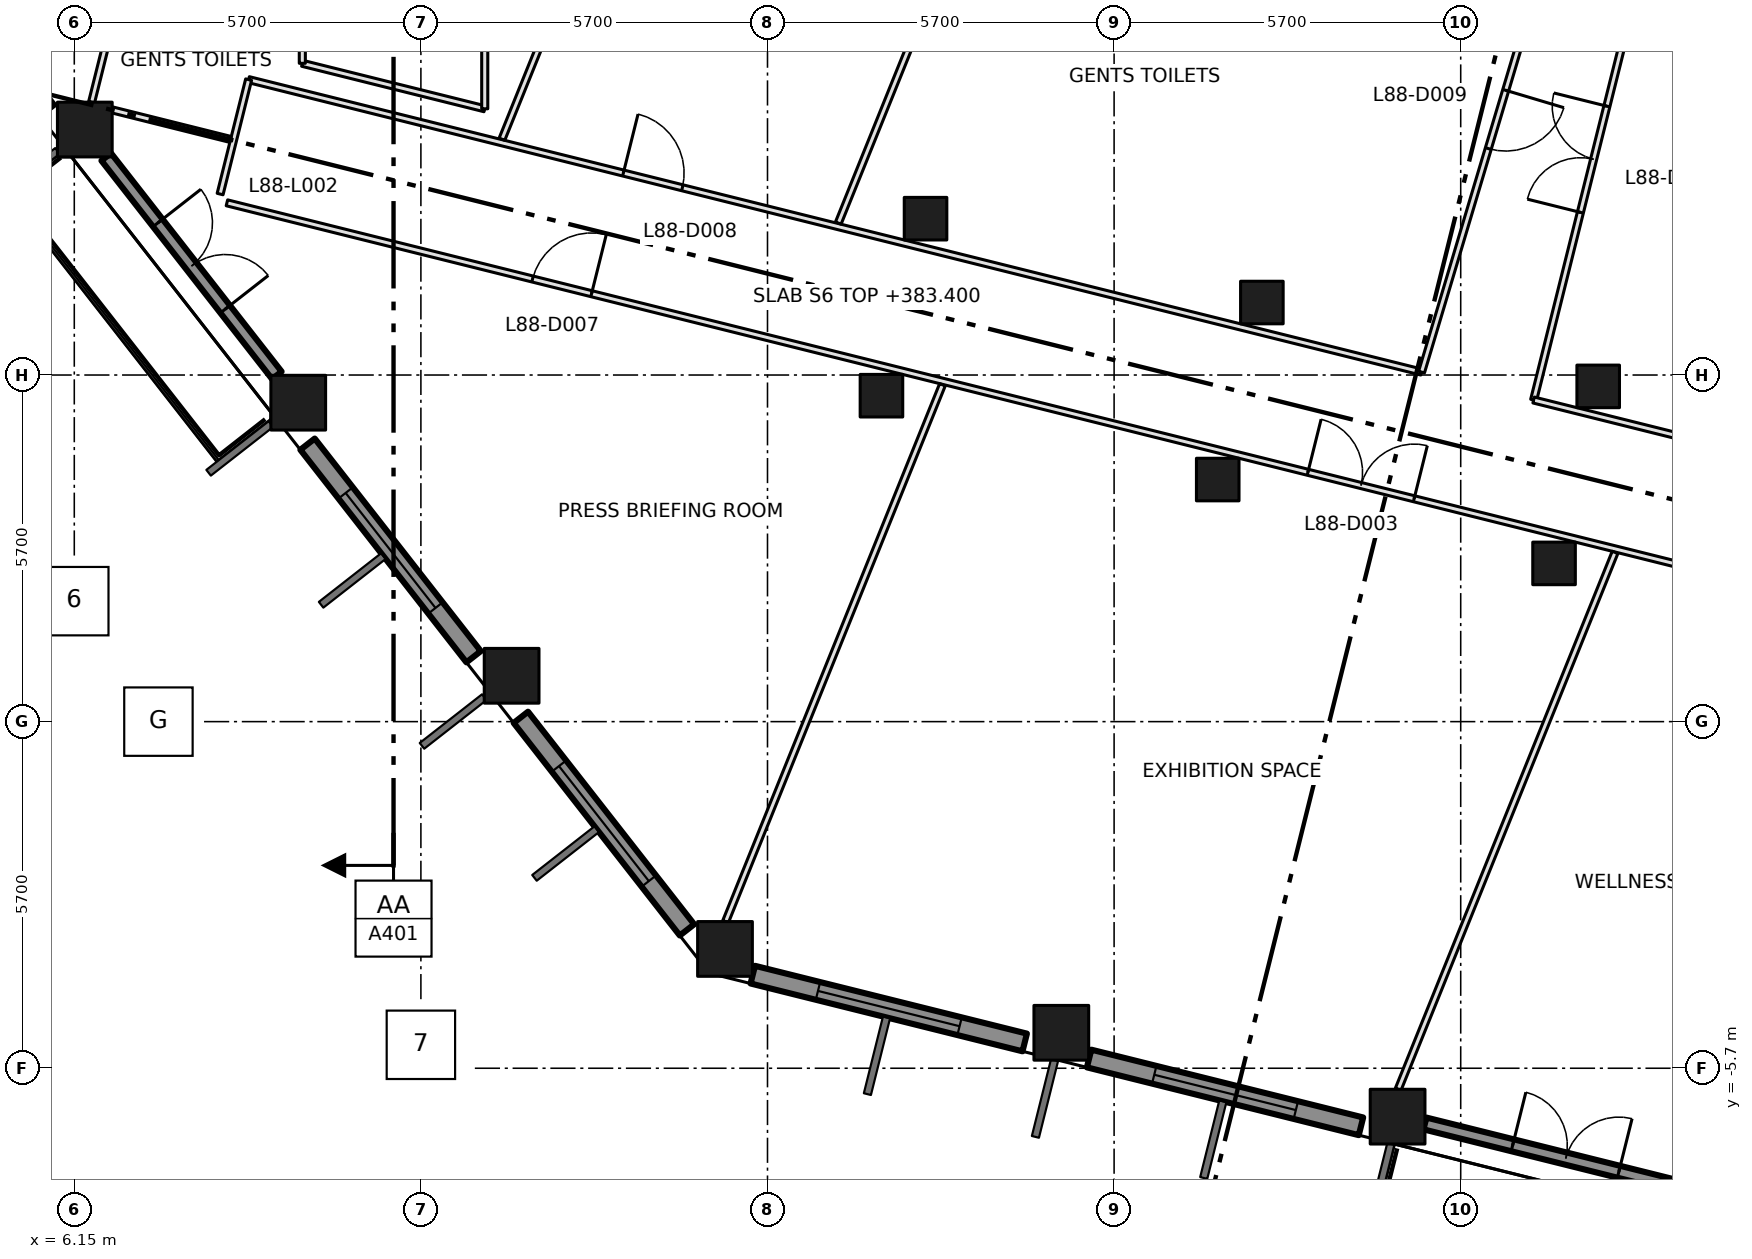
"""IFC4 building model, lengths in metres.
Left out: names, types, materials, properties, quantities, classifications, styles, units other than length and angle.
Written with IfcOpenShell. Run it as: python <this file> out.ifc"""

import sys

from ifc_helpers import new_model, si_unit, direction, frame, frame_2d, origin, origin_2d, place, context, subcontext, project, spatial, rectangle, extrude, element, fill, save


model = new_model("IFC4")
c1 = context("Model", 3, precision=1e-05, world=origin(), true_north=direction((0.0, 1.0)))
c2 = subcontext(c1, "Body", "Model", "MODEL_VIEW")
j1 = project(units=[si_unit("LENGTHUNIT", "METRE"), si_unit("PLANEANGLEUNIT", "RADIAN")], contexts=[c1])
p1 = place(None, origin())
s1 = spatial("IfcSite", under=j1, at=p1, CompositionType="ELEMENT")
p2 = place(p1, origin())
s2 = spatial("IfcBuilding", under=s1, at=p2, CompositionType="ELEMENT")
p3 = place(p2, frame((0.0, 0.0, 383.4)))
s3 = spatial("IfcBuildingStorey", under=s2, at=p3, CompositionType="ELEMENT", Elevation=383.4)
for number, where, z_axis, x_axis in (
    (1, (16.851, -3.738, 0.0), (0.0, 0.0, 1.0), (1.0, 0.0, 0.0)),
    (2, (13.342, 0.754, 0.0), (0.0, 0.0, 1.0), (1.0, 0.0, 0.0)),
    (3, (9.833, 5.245, 0.0), (0.0, 0.0, 1.0), (1.0, 0.0, 0.0)),
    (4, (6.323, 9.737, 0.0), (0.0, 0.0, 1.0), (1.0, 0.0, 0.0)),
    (5, (22.382, -5.117, 0.0), (0.0, 0.0, 1.0), (1.0, 0.0, 0.0)),
    (6, (27.912, -6.496, 0.0), (0.0, 0.0, 1.0), (1.0, 0.0, 0.0)),
):
    element("IfcColumn", number, at=place(p3, frame(where, z_axis=z_axis, x_axis=x_axis)), inside=s3, PredefinedType="COLUMN", context=c2, shape_type="SweptSolid", body=[
        extrude(rectangle(XDim=0.9, YDim=0.9, at=origin_2d()), origin(), (0.0, 0.0, 1.0), 4.2),
    ])
for number, where, z_axis, x_axis in (
    (7, (19.424, 5.36, 0.0), (0.0, 0.0, 1.0), (1.0, 0.0, 0.0)),
    (8, (24.954, 3.981, 0.0), (0.0, 0.0, 1.0), (1.0, 0.0, 0.0)),
    (9, (30.485, 2.602, 0.0), (0.0, 0.0, 1.0), (1.0, 0.0, 0.0)),
    (10, (20.149, 8.271, 0.0), (0.0, 0.0, 1.0), (1.0, 0.0, 0.0)),
    (11, (25.68, 6.892, 0.0), (0.0, 0.0, 1.0), (1.0, 0.0, 0.0)),
    (12, (31.211, 5.513, 0.0), (0.0, 0.0, 1.0), (1.0, 0.0, 0.0)),
):
    element("IfcColumn", number, at=place(p3, frame(where, z_axis=z_axis, x_axis=x_axis)), inside=s3, PredefinedType="COLUMN", context=c2, shape_type="SweptSolid", body=[
        extrude(rectangle(XDim=0.7, YDim=0.7, at=origin_2d()), origin(), (0.0, 0.0, 1.0), 4.2),
    ])
p4 = place(p3, frame((2.967, 13.547, 0.0), z_axis=(0.0, 0.0, 1.0), x_axis=(0.615486001463, -0.788147817356, 0.0)))
e13 = element("IfcWall", 13, at=p4, inside=s3, PredefinedType="SOLIDWALL", context=c2, shape_type="SweptSolid", body=[
    extrude(rectangle(XDim=4.437, YDim=0.3, at=frame_2d((2.219, 0.0))), origin(), (0.0, 0.0, 1.0), 3.2),
])
p5 = place(p4, frame((1.018, 0.0, 0.8)))
e14 = element("IfcOpeningElement", 14, at=p5, cuts=e13, PredefinedType="OPENING", context=c2, shape_type="SweptSolid", body=[
    extrude(rectangle(XDim=2.4, YDim=2.1, at=frame_2d((1.2, 1.05))), frame((0.0, 0.16, 0.0), z_axis=(0.0, -1.0, 0.0), x_axis=(1.0, 0.0, 0.0)), (0.0, 0.0, 1.0), 0.32),
])
p6 = place(p3, frame((6.675, 9.287, 0.0), z_axis=(0.0, 0.0, 1.0), x_axis=(0.615593109271, -0.788064162247, 0.0)))
e15 = element("IfcWall", 15, at=p6, inside=s3, PredefinedType="SOLIDWALL", context=c2, shape_type="SweptSolid", body=[
    extrude(rectangle(XDim=4.558, YDim=0.2, at=frame_2d((2.279, 0.0))), origin(), (0.0, 0.0, 1.0), 3.2),
])
p7 = place(p6, frame((1.378, 0.0, 0.0)))
e16 = element("IfcOpeningElement", 16, at=p7, cuts=e15, PredefinedType="OPENING", context=c2, shape_type="SweptSolid", body=[
    extrude(rectangle(XDim=1.8, YDim=2.9, at=frame_2d((0.9, 1.45))), frame((0.0, 0.11, 0.0), z_axis=(0.0, -1.0, 0.0), x_axis=(1.0, 0.0, 0.0)), (0.0, 0.0, 1.0), 0.22),
])
p8 = place(p3, frame((9.986, 4.563, 0.0), z_axis=(0.0, 0.0, 1.0), x_axis=(0.615592779411, -0.788064419915, 0.0)))
e17 = element("IfcWall", 17, at=p8, inside=s3, PredefinedType="SOLIDWALL", context=c2, shape_type="SweptSolid", body=[
    extrude(rectangle(XDim=4.436, YDim=0.3, at=frame_2d((2.218, 0.0))), origin(), (0.0, 0.0, 1.0), 3.2),
])
p9 = place(p8, frame((1.018, 0.0, 0.8)))
e18 = element("IfcOpeningElement", 18, at=p9, cuts=e17, PredefinedType="OPENING", context=c2, shape_type="SweptSolid", body=[
    extrude(rectangle(XDim=2.4, YDim=2.1, at=frame_2d((1.2, 1.05))), frame((0.0, 0.16, 0.0), z_axis=(0.0, -1.0, 0.0), x_axis=(1.0, 0.0, 0.0)), (0.0, 0.0, 1.0), 0.32),
])
p10 = place(p3, frame((13.494, 0.071, 0.0), z_axis=(0.0, 0.0, 1.0), x_axis=(0.615763624226, -0.787930935476, 0.0)))
e19 = element("IfcWall", 19, at=p10, inside=s3, PredefinedType="SOLIDWALL", context=c2, shape_type="SweptSolid", body=[
    extrude(rectangle(XDim=4.437, YDim=0.3, at=frame_2d((2.219, 0.0))), origin(), (0.0, 0.0, 1.0), 3.2),
])
p11 = place(p10, frame((1.018, 0.0, 0.8)))
e20 = element("IfcOpeningElement", 20, at=p11, cuts=e19, PredefinedType="OPENING", context=c2, shape_type="SweptSolid", body=[
    extrude(rectangle(XDim=2.4, YDim=2.1, at=frame_2d((1.2, 1.05))), frame((0.0, 0.16, 0.0), z_axis=(0.0, -1.0, 0.0), x_axis=(1.0, 0.0, 0.0)), (0.0, 0.0, 1.0), 0.32),
])
p12 = place(p3, frame((17.308, -4.161, 0.0), z_axis=(0.0, 0.0, 1.0), x_axis=(0.970294992984, -0.241924836652, 0.0)))
e21 = element("IfcWall", 21, at=p12, inside=s3, PredefinedType="SOLIDWALL", context=c2, shape_type="SweptSolid", body=[
    extrude(rectangle(XDim=4.609, YDim=0.3, at=frame_2d((2.304, 0.0))), origin(), (0.0, 0.0, 1.0), 3.2),
])
p13 = place(p12, frame((1.105, 0.0, 0.8)))
e22 = element("IfcOpeningElement", 22, at=p13, cuts=e21, PredefinedType="OPENING", context=c2, shape_type="SweptSolid", body=[
    extrude(rectangle(XDim=2.4, YDim=2.1, at=frame_2d((1.2, 1.05))), frame((0.0, 0.16, 0.0), z_axis=(0.0, -1.0, 0.0), x_axis=(1.0, 0.0, 0.0)), (0.0, 0.0, 1.0), 0.32),
])
p14 = place(p3, frame((22.839, -5.54, 0.0), z_axis=(0.0, 0.0, 1.0), x_axis=(0.970282587769, -0.241974585177, 0.0)))
e23 = element("IfcWall", 23, at=p14, inside=s3, PredefinedType="SOLIDWALL", context=c2, shape_type="SweptSolid", body=[
    extrude(rectangle(XDim=4.608, YDim=0.3, at=frame_2d((2.304, 0.0))), origin(), (0.0, 0.0, 1.0), 3.2),
])
p15 = place(p14, frame((1.104, 0.0, 0.8)))
e24 = element("IfcOpeningElement", 24, at=p15, cuts=e23, PredefinedType="OPENING", context=c2, shape_type="SweptSolid", body=[
    extrude(rectangle(XDim=2.4, YDim=2.1, at=frame_2d((1.2, 1.05))), frame((0.0, 0.16, 0.0), z_axis=(0.0, -1.0, 0.0), x_axis=(1.0, 0.0, 0.0)), (0.0, 0.0, 1.0), 0.32),
])
p16 = place(p3, frame((28.362, -6.608, 0.0), z_axis=(0.0, 0.0, 1.0), x_axis=(0.970322781135, -0.241813358626, 0.0)))
e25 = element("IfcWall", 25, at=p16, inside=s3, PredefinedType="SOLIDWALL", context=c2, shape_type="SweptSolid", body=[
    extrude(rectangle(XDim=4.772, YDim=0.2, at=frame_2d((2.386, 0.0))), origin(), (0.0, 0.0, 1.0), 3.2),
])
p17 = place(p16, frame((1.486, 0.0, 0.0)))
e26 = element("IfcOpeningElement", 26, at=p17, cuts=e25, PredefinedType="OPENING", context=c2, shape_type="SweptSolid", body=[
    extrude(rectangle(XDim=1.8, YDim=2.9, at=frame_2d((0.9, 1.45))), frame((0.0, 0.11, 0.0), z_axis=(0.0, -1.0, 0.0), x_axis=(1.0, 0.0, 0.0)), (0.0, 0.0, 1.0), 0.22),
])
p18 = place(p3, frame((8.66, 8.532, 0.0), z_axis=(0.0, 0.0, 1.0), x_axis=(0.970305360263, -0.241883252509, 0.0)))
e27 = element("IfcWall", 27, at=p18, inside=s3, PredefinedType="PARTITIONING", context=c2, shape_type="SweptSolid", body=[
    extrude(rectangle(XDim=28.356, YDim=0.1, at=frame_2d((14.178, 0.0))), origin(), (0.0, 0.0, 1.0), 3.9),
])
p19 = place(p18, frame((18.321, 0.0, 0.0)))
e28 = element("IfcOpeningElement", 28, at=p19, cuts=e27, PredefinedType="OPENING", context=c2, shape_type="SweptSolid", body=[
    extrude(rectangle(XDim=1.8, YDim=2.1, at=frame_2d((0.9, 1.05))), frame((0.0, 0.06, 0.0), z_axis=(0.0, -1.0, 0.0), x_axis=(1.0, 0.0, 0.0)), (0.0, 0.0, 1.0), 0.12),
])
p20 = place(p18, frame((25.22, 0.0, 0.0)))
e29 = element("IfcOpeningElement", 29, at=p20, cuts=e27, PredefinedType="OPENING", context=c2, shape_type="SweptSolid", body=[
    extrude(rectangle(XDim=1.0, YDim=2.1, at=frame_2d((0.5, 1.05))), frame((0.0, 0.06, 0.0), z_axis=(0.0, -1.0, 0.0), x_axis=(1.0, 0.0, 0.0)), (0.0, 0.0, 1.0), 0.12),
])
p21 = place(p18, frame((5.18, 0.0, 0.0)))
e30 = element("IfcOpeningElement", 30, at=p21, cuts=e27, PredefinedType="OPENING", context=c2, shape_type="SweptSolid", body=[
    extrude(rectangle(XDim=1.0, YDim=2.1, at=frame_2d((0.5, 1.05))), frame((0.0, 0.06, 0.0), z_axis=(0.0, -1.0, 0.0), x_axis=(1.0, 0.0, 0.0)), (0.0, 0.0, 1.0), 0.12),
])
p22 = place(p3, frame((9.017, 10.558, 0.0), z_axis=(0.0, 0.0, 1.0), x_axis=(0.970286089829, -0.241960542, 0.0)))
e31 = element("IfcWall", 31, at=p22, inside=s3, PredefinedType="PARTITIONING", context=c2, shape_type="SweptSolid", body=[
    extrude(rectangle(XDim=19.879, YDim=0.1, at=frame_2d((9.94, 0.0))), origin(), (0.0, 0.0, 1.0), 3.9),
])
p23 = place(p22, frame((6.351, 0.0, 0.0)))
e32 = element("IfcOpeningElement", 32, at=p23, cuts=e31, PredefinedType="OPENING", context=c2, shape_type="SweptSolid", body=[
    extrude(rectangle(XDim=1.0, YDim=2.1, at=frame_2d((0.5, 1.05))), frame((0.0, 0.06, 0.0), z_axis=(0.0, -1.0, 0.0), x_axis=(1.0, 0.0, 0.0)), (0.0, 0.0, 1.0), 0.12),
])
p24 = place(p3, frame((9.017, 10.558, 0.0), z_axis=(0.0, 0.0, 1.0), x_axis=(-0.241795146079, -0.970327319688, 0.0)))
e33 = element("IfcWall", 33, at=p24, inside=s3, PredefinedType="PARTITIONING", context=c2, shape_type="SweptSolid", body=[
    extrude(rectangle(XDim=1.94, YDim=0.1, at=frame_2d((0.97, 0.0))), origin(), (0.0, 0.0, 1.0), 3.9),
])
p25 = place(p3, frame((9.9, 10.826, 0.0), z_axis=(0.0, 0.0, 1.0), x_axis=(0.970290953223, -0.241941038466, 0.0)))
e34 = element("IfcWall", 34, at=p25, inside=s3, PredefinedType="PARTITIONING", context=c2, shape_type="SweptSolid", body=[
    extrude(rectangle(XDim=3.092, YDim=0.1, at=frame_2d((1.546, 0.0))), origin(), (0.0, 0.0, 1.0), 3.9),
])
p26 = place(p3, frame((9.9, 12.2, 0.0), z_axis=(0.0, 0.0, 1.0), x_axis=(0.0, -1.0, 0.0)))
e35 = element("IfcWall", 35, at=p26, inside=s3, PredefinedType="PARTITIONING", context=c2, shape_type="SweptSolid", body=[
    extrude(rectangle(XDim=1.374, YDim=0.1, at=frame_2d((0.687, 0.0))), origin(), (0.0, 0.0, 1.0), 3.9),
])
p27 = place(p3, frame((12.9, 10.078, 0.0), z_axis=(0.0, 0.0, 1.0), x_axis=(0.0, 1.0, 0.0)))
e36 = element("IfcWall", 36, at=p27, inside=s3, PredefinedType="PARTITIONING", context=c2, shape_type="SweptSolid", body=[
    extrude(rectangle(XDim=4.022, YDim=0.1, at=frame_2d((2.011, 0.0))), origin(), (0.0, 0.0, 1.0), 3.9),
])
p28 = place(p3, frame((30.149, 5.289, 0.0), z_axis=(0.0, 0.0, 1.0), x_axis=(0.241978995789, 0.970281487815, 0.0)))
e37 = element("IfcWall", 37, at=p28, inside=s3, PredefinedType="PARTITIONING", context=c2, shape_type="SweptSolid", body=[
    extrude(rectangle(XDim=8.05, YDim=0.1, at=frame_2d((4.025, 0.0))), origin(), (0.0, 0.0, 1.0), 3.9),
])
p29 = place(p28, frame((3.18, 0.0, 0.0)))
e38 = element("IfcOpeningElement", 38, at=p29, cuts=e37, PredefinedType="OPENING", context=c2, shape_type="SweptSolid", body=[
    extrude(rectangle(XDim=1.8, YDim=2.1, at=frame_2d((0.9, 1.05))), frame((0.0, 0.06, 0.0), z_axis=(0.0, -1.0, 0.0), x_axis=(1.0, 0.0, 0.0)), (0.0, 0.0, 1.0), 0.12),
])
p30 = place(p3, frame((30.8, 14.1, 0.0), z_axis=(0.0, 0.0, 1.0), x_axis=(-0.286139929679, -0.958187842045, 0.0)))
e39 = element("IfcWall", 39, at=p30, inside=s3, PredefinedType="PARTITIONING", context=c2, shape_type="SweptSolid", body=[
    extrude(rectangle(XDim=8.717, YDim=0.1, at=frame_2d((4.358, 0.0))), origin(), (0.0, 0.0, 1.0), 3.9),
])
p31 = place(p30, frame((3.88, 0.0, 0.0)))
e40 = element("IfcOpeningElement", 40, at=p31, cuts=e39, PredefinedType="OPENING", context=c2, shape_type="SweptSolid", body=[
    extrude(rectangle(XDim=1.0, YDim=2.1, at=frame_2d((0.5, 1.05))), frame((0.0, 0.06, 0.0), z_axis=(0.0, -1.0, 0.0), x_axis=(1.0, 0.0, 0.0)), (0.0, 0.0, 1.0), 0.12),
])
p32 = place(p3, frame((36.67, 3.663, 0.0), z_axis=(0.0, 0.0, 1.0), x_axis=(-0.970291897054, 0.241937253253, 0.0)))
e41 = element("IfcWall", 41, at=p32, inside=s3, PredefinedType="PARTITIONING", context=c2, shape_type="SweptSolid", body=[
    extrude(rectangle(XDim=6.721, YDim=0.1, at=frame_2d((3.36, 0.0))), origin(), (0.0, 0.0, 1.0), 3.9),
])
p33 = place(p3, frame((6.922, 12.138, 0.0), z_axis=(0.0, 0.0, 1.0), x_axis=(-0.24222136375, -0.97022101139, 0.0)))
e42 = element("IfcWall", 42, at=p33, inside=s3, PredefinedType="PARTITIONING", context=c2, shape_type="SweptSolid", body=[
    extrude(rectangle(XDim=2.011, YDim=0.1, at=frame_2d((1.005, 0.0))), origin(), (0.0, 0.0, 1.0), 3.9),
])
p34 = place(p3, frame((8.72, 9.574, 0.0), z_axis=(0.0, 0.0, 1.0), x_axis=(-0.970221168815, 0.24222073318, 0.0)))
e43 = element("IfcWall", 43, at=p34, inside=s3, PredefinedType="PARTITIONING", context=c2, shape_type="SweptSolid", body=[
    extrude(rectangle(XDim=2.007, YDim=0.1, at=frame_2d((1.003, 0.0))), origin(), (0.0, 0.0, 1.0), 3.9),
])
p35 = place(p3, frame((13.183, 9.578, 0.0), z_axis=(0.0, 0.0, 1.0), x_axis=(0.374400970809, 0.927266904973, 0.0)))
e44 = element("IfcWall", 44, at=p35, inside=s3, PredefinedType="PARTITIONING", context=c2, shape_type="SweptSolid", body=[
    extrude(rectangle(XDim=4.877, YDim=0.1, at=frame_2d((2.438, 0.0))), origin(), (0.0, 0.0, 1.0), 3.9),
])
p36 = place(p3, frame((16.861, -3.288, 0.0), z_axis=(0.0, 0.0, 1.0), x_axis=(0.374527492133, 0.927215809635, 0.0)))
e45 = element("IfcWall", 45, at=p36, inside=s3, PredefinedType="PARTITIONING", context=c2, shape_type="SweptSolid", body=[
    extrude(rectangle(XDim=9.521, YDim=0.1, at=frame_2d((4.76, 0.0))), origin(), (0.0, 0.0, 1.0), 3.9),
])
p37 = place(p3, frame((18.714, 8.199, 0.0), z_axis=(0.0, 0.0, 1.0), x_axis=(0.374418014388, 0.927260023133, 0.0)))
e46 = element("IfcWall", 46, at=p37, inside=s3, PredefinedType="PARTITIONING", context=c2, shape_type="SweptSolid", body=[
    extrude(rectangle(XDim=6.364, YDim=0.1, at=frame_2d((3.182, 0.0))), origin(), (0.0, 0.0, 1.0), 3.9),
])
p38 = place(p3, frame((27.922, -6.046, 0.0), z_axis=(0.0, 0.0, 1.0), x_axis=(0.374500779928, 0.927226598968, 0.0)))
e47 = element("IfcWall", 47, at=p38, inside=s3, PredefinedType="PARTITIONING", context=c2, shape_type="SweptSolid", body=[
    extrude(rectangle(XDim=9.522, YDim=0.1, at=frame_2d((4.761, 0.0))), origin(), (0.0, 0.0, 1.0), 3.9),
])
p39 = place(p7, origin())
e48 = element("IfcDoor", 48, at=p39, inside=s3, OperationType="DOUBLE_DOOR_SINGLE_SWING", PredefinedType="DOOR", context=c2, shape_type="SweptSolid", body=[
    extrude(rectangle(XDim=1.8, YDim=2.9, at=frame_2d((0.9, 1.45))), frame((0.0, 0.025, 0.0), z_axis=(0.0, -1.0, 0.0), x_axis=(1.0, 0.0, 0.0)), (0.0, 0.0, 1.0), 0.05),
])
fill(e16, e48)
p40 = place(p9, origin())
e49 = element("IfcWindow", 49, at=p40, inside=s3, PartitioningType="DOUBLE_PANEL_VERTICAL", PredefinedType="WINDOW", context=c2, shape_type="SweptSolid", body=[
    extrude(rectangle(XDim=2.4, YDim=2.1, at=frame_2d((1.2, 1.05))), frame((0.0, 0.03, 0.0), z_axis=(0.0, -1.0, 0.0), x_axis=(1.0, 0.0, 0.0)), (0.0, 0.0, 1.0), 0.06),
])
fill(e18, e49)
p41 = place(p11, origin())
e50 = element("IfcWindow", 50, at=p41, inside=s3, PartitioningType="DOUBLE_PANEL_VERTICAL", PredefinedType="WINDOW", context=c2, shape_type="SweptSolid", body=[
    extrude(rectangle(XDim=2.4, YDim=2.1, at=frame_2d((1.2, 1.05))), frame((0.0, 0.03, 0.0), z_axis=(0.0, -1.0, 0.0), x_axis=(1.0, 0.0, 0.0)), (0.0, 0.0, 1.0), 0.06),
])
fill(e20, e50)
p42 = place(p13, origin())
e51 = element("IfcWindow", 51, at=p42, inside=s3, PartitioningType="DOUBLE_PANEL_VERTICAL", PredefinedType="WINDOW", context=c2, shape_type="SweptSolid", body=[
    extrude(rectangle(XDim=2.4, YDim=2.1, at=frame_2d((1.2, 1.05))), frame((0.0, 0.03, 0.0), z_axis=(0.0, -1.0, 0.0), x_axis=(1.0, 0.0, 0.0)), (0.0, 0.0, 1.0), 0.06),
])
fill(e22, e51)
p43 = place(p15, origin())
e52 = element("IfcWindow", 52, at=p43, inside=s3, PartitioningType="DOUBLE_PANEL_VERTICAL", PredefinedType="WINDOW", context=c2, shape_type="SweptSolid", body=[
    extrude(rectangle(XDim=2.4, YDim=2.1, at=frame_2d((1.2, 1.05))), frame((0.0, 0.03, 0.0), z_axis=(0.0, -1.0, 0.0), x_axis=(1.0, 0.0, 0.0)), (0.0, 0.0, 1.0), 0.06),
])
fill(e24, e52)
p44 = place(p17, origin())
e53 = element("IfcDoor", 53, at=p44, inside=s3, OperationType="DOUBLE_DOOR_SINGLE_SWING", PredefinedType="DOOR", context=c2, shape_type="SweptSolid", body=[
    extrude(rectangle(XDim=1.8, YDim=2.9, at=frame_2d((0.9, 1.45))), frame((0.0, 0.025, 0.0), z_axis=(0.0, -1.0, 0.0), x_axis=(1.0, 0.0, 0.0)), (0.0, 0.0, 1.0), 0.05),
])
fill(e26, e53)
p45 = place(p19, origin())
e54 = element("IfcDoor", 54, at=p45, inside=s3, OperationType="DOUBLE_DOOR_SINGLE_SWING", PredefinedType="DOOR", context=c2, shape_type="SweptSolid", body=[
    extrude(rectangle(XDim=1.8, YDim=2.1, at=frame_2d((0.9, 1.05))), frame((0.0, 0.025, 0.0), z_axis=(0.0, -1.0, 0.0), x_axis=(1.0, 0.0, 0.0)), (0.0, 0.0, 1.0), 0.05),
])
fill(e28, e54)
p46 = place(p21, origin())
e55 = element("IfcDoor", 55, at=p46, inside=s3, OperationType="SINGLE_SWING_RIGHT", PredefinedType="DOOR", context=c2, shape_type="SweptSolid", body=[
    extrude(rectangle(XDim=1.0, YDim=2.1, at=frame_2d((0.5, 1.05))), frame((0.0, 0.025, 0.0), z_axis=(0.0, -1.0, 0.0), x_axis=(1.0, 0.0, 0.0)), (0.0, 0.0, 1.0), 0.05),
])
fill(e30, e55)
p47 = place(p23, origin())
e56 = element("IfcDoor", 56, at=p47, inside=s3, OperationType="SINGLE_SWING_LEFT", PredefinedType="DOOR", context=c2, shape_type="SweptSolid", body=[
    extrude(rectangle(XDim=1.0, YDim=2.1, at=frame_2d((0.5, 1.05))), frame((0.0, 0.025, 0.0), z_axis=(0.0, -1.0, 0.0), x_axis=(1.0, 0.0, 0.0)), (0.0, 0.0, 1.0), 0.05),
])
fill(e32, e56)
p48 = place(p31, origin())
e57 = element("IfcDoor", 57, at=p48, inside=s3, OperationType="SINGLE_SWING_LEFT", PredefinedType="DOOR", context=c2, shape_type="SweptSolid", body=[
    extrude(rectangle(XDim=1.0, YDim=2.1, at=frame_2d((0.5, 1.05))), frame((0.0, 0.025, 0.0), z_axis=(0.0, -1.0, 0.0), x_axis=(1.0, 0.0, 0.0)), (0.0, 0.0, 1.0), 0.05),
])
fill(e40, e57)
p49 = place(p29, origin())
e58 = element("IfcDoor", 58, at=p49, inside=s3, OperationType="DOUBLE_DOOR_SINGLE_SWING", PredefinedType="DOOR", context=c2, shape_type="SweptSolid", body=[
    extrude(rectangle(XDim=1.8, YDim=2.1, at=frame_2d((0.9, 1.05))), frame((0.0, 0.025, 0.0), z_axis=(0.0, -1.0, 0.0), x_axis=(1.0, 0.0, 0.0)), (0.0, 0.0, 1.0), 0.05),
])
fill(e38, e58)
save(model, sys.argv[1])
